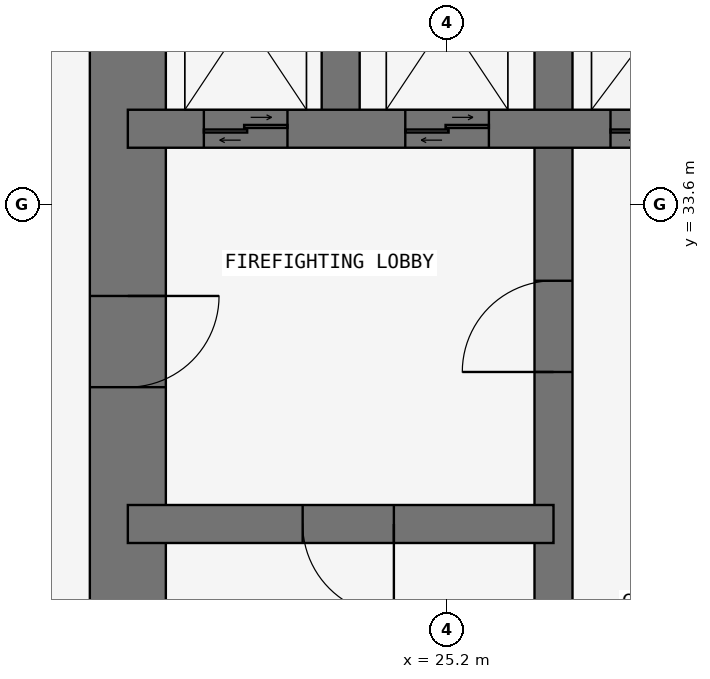
"""IFC4 building model, lengths in metres.
Left out: names, types, materials, properties, quantities, classifications, styles, units other than length and angle.
Written with IfcOpenShell. Run it as: python <this file> out.ifc"""

import sys

from ifc_helpers import new_model, si_unit, direction, frame, frame_2d, origin, place, context, subcontext, project, spatial, rectangle, extrude, element, fill, save


model = new_model("IFC4")
c1 = context("Model", 3, precision=1e-05, world=origin(), true_north=direction((0.0, 1.0)))
c2 = subcontext(c1, "Body", "Model", "MODEL_VIEW")
j1 = project(units=[si_unit("LENGTHUNIT", "METRE"), si_unit("PLANEANGLEUNIT", "RADIAN")], contexts=[c1])
p1 = place(None, origin())
s1 = spatial("IfcSite", under=j1, at=p1, CompositionType="ELEMENT")
p2 = place(p1, origin())
s2 = spatial("IfcBuilding", under=s1, at=p2, CompositionType="ELEMENT")
p3 = place(p2, frame((0.0, 0.0, 63.3)))
s3 = spatial("IfcBuildingStorey", under=s2, at=p3, CompositionType="ELEMENT", Elevation=63.3)
p4 = place(p3, frame((21.0, 37.8, 0.0), z_axis=(0.0, 0.0, 1.0), x_axis=(0.0, -1.0, 0.0)))
e1 = element("IfcWall", 1, at=p4, inside=s3, PredefinedType="SHEAR", context=c2, shape_type="SweptSolid", body=[
    extrude(rectangle(XDim=17.3, YDim=1.0, at=frame_2d((8.65, 0.0))), origin(), (0.0, 0.0, 1.0), 3.6),
])
p5 = place(p4, frame((5.4, 0.0, 0.0)))
e2 = element("IfcOpeningElement", 2, at=p5, cuts=e1, PredefinedType="OPENING", context=c2, shape_type="SweptSolid", body=[
    extrude(rectangle(XDim=1.2, YDim=2.1, at=frame_2d((0.6, 1.05))), frame((0.0, 0.51, 0.0), z_axis=(0.0, -1.0, 0.0), x_axis=(1.0, 0.0, 0.0)), (0.0, 0.0, 1.0), 1.02),
])
p6 = place(p3, frame((26.6, 21.0, 0.0), z_axis=(0.0, 0.0, 1.0), x_axis=(0.0, 1.0, 0.0)))
e3 = element("IfcWall", 3, at=p6, inside=s3, PredefinedType="SHEAR", context=c2, shape_type="SweptSolid", body=[
    extrude(rectangle(XDim=16.8, YDim=0.5, at=frame_2d((8.4, 0.0))), origin(), (0.0, 0.0, 1.0), 3.6),
])
p7 = place(p6, frame((10.4, 0.0, 0.0)))
e4 = element("IfcOpeningElement", 4, at=p7, cuts=e3, PredefinedType="OPENING", context=c2, shape_type="SweptSolid", body=[
    extrude(rectangle(XDim=1.2, YDim=2.1, at=frame_2d((0.6, 1.05))), frame((0.0, 0.26, 0.0), z_axis=(0.0, -1.0, 0.0), x_axis=(1.0, 0.0, 0.0)), (0.0, 0.0, 1.0), 0.52),
])
p8 = place(p3, frame((21.0, 29.4, 0.0), z_axis=(0.0, 0.0, 1.0), x_axis=(1.0, 0.0, 0.0)))
e5 = element("IfcWall", 5, at=p8, inside=s3, PredefinedType="SHEAR", context=c2, shape_type="SweptSolid", body=[
    extrude(rectangle(XDim=5.6, YDim=0.5, at=frame_2d((2.8, 0.0))), origin(), (0.0, 0.0, 1.0), 3.6),
])
p9 = place(p8, frame((2.3, 0.0, 0.0)))
e6 = element("IfcOpeningElement", 6, at=p9, cuts=e5, PredefinedType="OPENING", context=c2, shape_type="SweptSolid", body=[
    extrude(rectangle(XDim=1.2, YDim=2.1, at=frame_2d((0.6, 1.05))), frame((0.0, 0.26, 0.0), z_axis=(0.0, -1.0, 0.0), x_axis=(1.0, 0.0, 0.0)), (0.0, 0.0, 1.0), 0.52),
])
p10 = place(p3, frame((21.0, 34.6, 0.0), z_axis=(0.0, 0.0, 1.0), x_axis=(1.0, 0.0, 0.0)))
e7 = element("IfcWall", 7, at=p10, inside=s3, PredefinedType="SHEAR", context=c2, shape_type="SweptSolid", body=[
    extrude(rectangle(XDim=11.2, YDim=0.5, at=frame_2d((5.6, 0.0))), origin(), (0.0, 0.0, 1.0), 3.6),
])
p11 = place(p10, frame((9.35, 0.0, 0.0)))
e8 = element("IfcOpeningElement", 8, at=p11, cuts=e7, PredefinedType="OPENING", context=c2, shape_type="SweptSolid", body=[
    extrude(rectangle(XDim=0.9, YDim=2.1, at=frame_2d((0.45, 1.05))), frame((0.0, 0.26, 0.0), z_axis=(0.0, -1.0, 0.0), x_axis=(1.0, 0.0, 0.0)), (0.0, 0.0, 1.0), 0.52),
])
p12 = place(p10, frame((1.0, 0.0, 0.0)))
e9 = element("IfcOpeningElement", 9, at=p12, cuts=e7, PredefinedType="OPENING", context=c2, shape_type="SweptSolid", body=[
    extrude(rectangle(XDim=1.1, YDim=2.1, at=frame_2d((0.55, 1.05))), frame((0.0, 0.26, 0.0), z_axis=(0.0, -1.0, 0.0), x_axis=(1.0, 0.0, 0.0)), (0.0, 0.0, 1.0), 0.52),
])
p13 = place(p10, frame((3.65, 0.0, 0.0)))
e10 = element("IfcOpeningElement", 10, at=p13, cuts=e7, PredefinedType="OPENING", context=c2, shape_type="SweptSolid", body=[
    extrude(rectangle(XDim=1.1, YDim=2.1, at=frame_2d((0.55, 1.05))), frame((0.0, 0.26, 0.0), z_axis=(0.0, -1.0, 0.0), x_axis=(1.0, 0.0, 0.0)), (0.0, 0.0, 1.0), 0.52),
])
p14 = place(p10, frame((6.35, 0.0, 0.0)))
e11 = element("IfcOpeningElement", 11, at=p14, cuts=e7, PredefinedType="OPENING", context=c2, shape_type="SweptSolid", body=[
    extrude(rectangle(XDim=1.3, YDim=2.1, at=frame_2d((0.65, 1.05))), frame((0.0, 0.26, 0.0), z_axis=(0.0, -1.0, 0.0), x_axis=(1.0, 0.0, 0.0)), (0.0, 0.0, 1.0), 0.52),
])
p15 = place(p3, frame((23.8, 34.6, 0.0), z_axis=(0.0, 0.0, 1.0), x_axis=(0.0, 1.0, 0.0)))
e12 = element("IfcWall", 12, at=p15, inside=s3, PredefinedType="SHEAR", context=c2, shape_type="SweptSolid", body=[
    extrude(rectangle(XDim=3.2, YDim=0.5, at=frame_2d((1.6, 0.0))), origin(), (0.0, 0.0, 1.0), 3.6),
])
p16 = place(p5, origin())
e13 = element("IfcDoor", 13, at=p16, inside=s3, OperationType="SINGLE_SWING_LEFT", PredefinedType="DOOR", context=c2, shape_type="SweptSolid", body=[
    extrude(rectangle(XDim=1.2, YDim=2.1, at=frame_2d((0.6, 1.05))), frame((0.0, 0.025, 0.0), z_axis=(0.0, -1.0, 0.0), x_axis=(1.0, 0.0, 0.0)), (0.0, 0.0, 1.0), 0.05),
])
fill(e2, e13)
p17 = place(p9, frame((1.2, 0.0, 0.0), z_axis=(0.0, 0.0, 1.0), x_axis=(-1.0, 0.0, 0.0)))
e14 = element("IfcDoor", 14, at=p17, inside=s3, OperationType="SINGLE_SWING_LEFT", PredefinedType="DOOR", context=c2, shape_type="SweptSolid", body=[
    extrude(rectangle(XDim=1.2, YDim=2.1, at=frame_2d((0.6, 1.05))), frame((0.0, 0.025, 0.0), z_axis=(0.0, -1.0, 0.0), x_axis=(1.0, 0.0, 0.0)), (0.0, 0.0, 1.0), 0.05),
])
fill(e6, e14)
p18 = place(p7, origin())
e15 = element("IfcDoor", 15, at=p18, inside=s3, OperationType="SINGLE_SWING_LEFT", PredefinedType="DOOR", context=c2, shape_type="SweptSolid", body=[
    extrude(rectangle(XDim=1.2, YDim=2.1, at=frame_2d((0.6, 1.05))), frame((0.0, 0.025, 0.0), z_axis=(0.0, -1.0, 0.0), x_axis=(1.0, 0.0, 0.0)), (0.0, 0.0, 1.0), 0.05),
])
fill(e4, e15)
p19 = place(p12, origin())
e16 = element("IfcDoor", 16, at=p19, inside=s3, OperationType="DOUBLE_DOOR_SLIDING", PredefinedType="DOOR", context=c2, shape_type="SweptSolid", body=[
    extrude(rectangle(XDim=1.1, YDim=2.1, at=frame_2d((0.55, 1.05))), frame((0.0, 0.025, 0.0), z_axis=(0.0, -1.0, 0.0), x_axis=(1.0, 0.0, 0.0)), (0.0, 0.0, 1.0), 0.05),
])
fill(e9, e16)
p20 = place(p13, origin())
e17 = element("IfcDoor", 17, at=p20, inside=s3, OperationType="DOUBLE_DOOR_SLIDING", PredefinedType="DOOR", context=c2, shape_type="SweptSolid", body=[
    extrude(rectangle(XDim=1.1, YDim=2.1, at=frame_2d((0.55, 1.05))), frame((0.0, 0.025, 0.0), z_axis=(0.0, -1.0, 0.0), x_axis=(1.0, 0.0, 0.0)), (0.0, 0.0, 1.0), 0.05),
])
fill(e10, e17)
p21 = place(p14, origin())
e18 = element("IfcDoor", 18, at=p21, inside=s3, OperationType="DOUBLE_DOOR_SLIDING", PredefinedType="DOOR", context=c2, shape_type="SweptSolid", body=[
    extrude(rectangle(XDim=1.3, YDim=2.1, at=frame_2d((0.65, 1.05))), frame((0.0, 0.025, 0.0), z_axis=(0.0, -1.0, 0.0), x_axis=(1.0, 0.0, 0.0)), (0.0, 0.0, 1.0), 0.05),
])
fill(e11, e18)
save(model, sys.argv[1])
